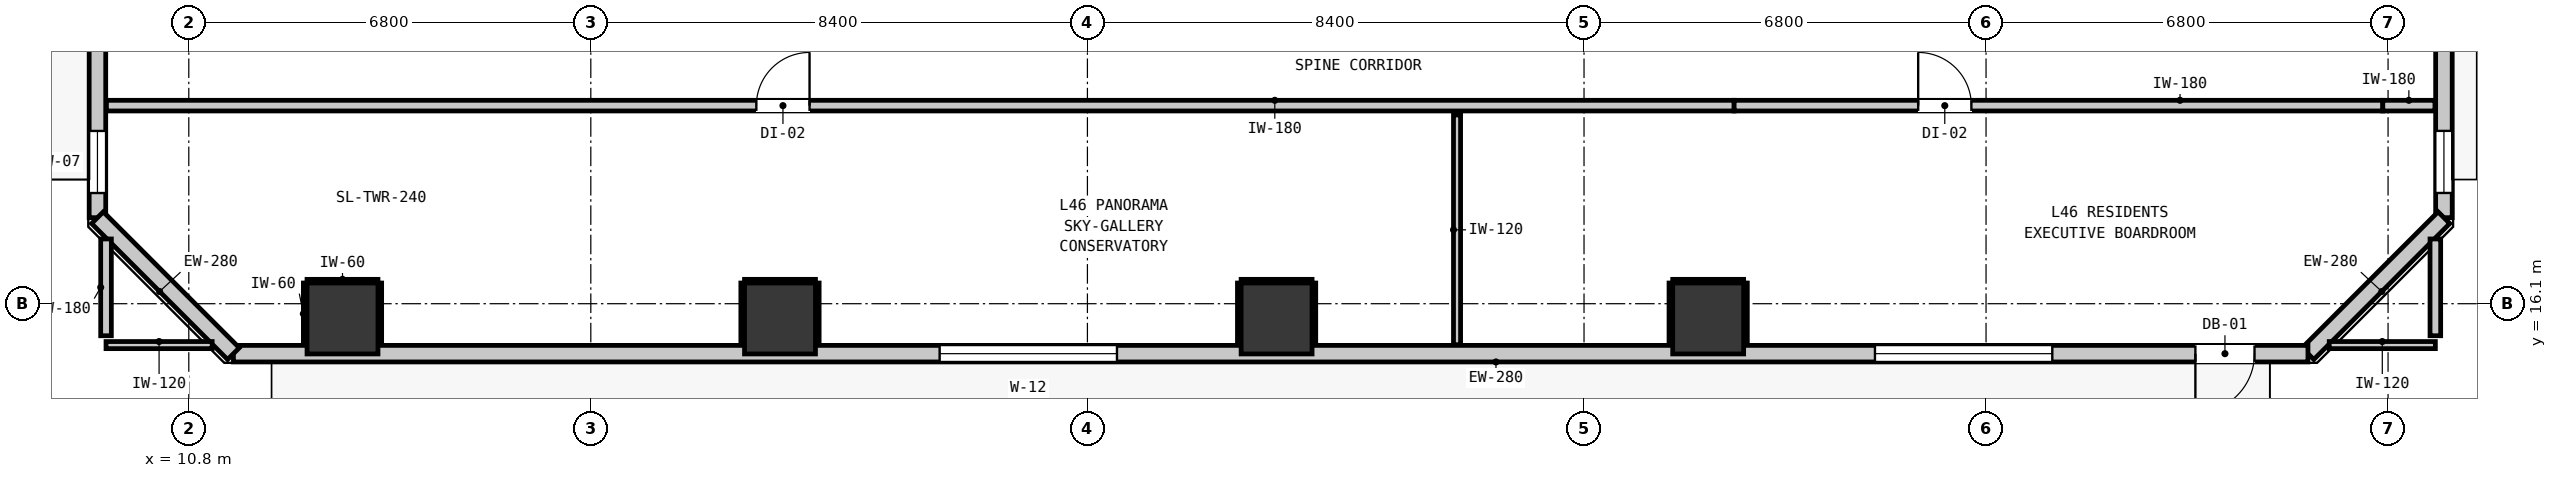
"""IFC4 building model, lengths in metres.
Left out: names, types, materials, properties, quantities, classifications, styles, units other than length and angle.
Written with IfcOpenShell. Run it as: python <this file> out.ifc"""

import sys

from ifc_helpers import new_model, si_unit, direction, frame, frame_2d, origin, origin_2d, place, context, subcontext, project, spatial, rectangle, extrude, element, fill, save


model = new_model("IFC4")
c1 = context("Model", 3, precision=1e-05, world=origin(), true_north=direction((0.0, 1.0)))
c2 = subcontext(c1, "Body", "Model", "MODEL_VIEW")
j1 = project(units=[si_unit("LENGTHUNIT", "METRE"), si_unit("PLANEANGLEUNIT", "RADIAN")], contexts=[c1])
p1 = place(None, origin())
s1 = spatial("IfcSite", under=j1, at=p1, CompositionType="ELEMENT")
p2 = place(p1, origin())
s2 = spatial("IfcBuilding", under=s1, at=p2, CompositionType="ELEMENT")
p3 = place(p2, frame((0.0, 0.0, 159.2)))
s3 = spatial("IfcBuildingStorey", under=s2, at=p3, CompositionType="ELEMENT", Elevation=159.2)
for number, where, z_axis, x_axis in (
    (1, (13.4, 15.85, 0.0), (0.0, 0.0, 1.0), (1.0, 0.0, 0.0)),
    (2, (20.8, 15.85, 0.0), (0.0, 0.0, 1.0), (1.0, 0.0, 0.0)),
    (3, (29.2, 15.85, 0.0), (0.0, 0.0, 1.0), (1.0, 0.0, 0.0)),
    (4, (36.5, 15.85, 0.0), (0.0, 0.0, 1.0), (1.0, 0.0, 0.0)),
):
    element("IfcColumn", number, at=place(p3, frame(where, z_axis=z_axis, x_axis=x_axis)), inside=s3, PredefinedType="COLUMN", context=c2, shape_type="SweptSolid", body=[
        extrude(rectangle(XDim=1.2, YDim=1.2, at=origin_2d()), origin(), (0.0, 0.0, 1.0), 3.32),
    ])
p4 = place(p3, frame((9.255, 17.555, 0.0), z_axis=(0.0, 0.0, 1.0), x_axis=(0.0, 1.0, 0.0)))
e5 = element("IfcWall", 5, at=p4, inside=s3, PredefinedType="STANDARD", context=c2, shape_type="SweptSolid", body=[
    extrude(rectangle(XDim=32.29, YDim=0.28, at=frame_2d((16.145, 0.0))), origin(), (0.0, 0.0, 1.0), 3.08),
])
p5 = place(p4, frame((5.467, 0.0, 0.0)))
e6 = element("IfcOpeningElement", 6, at=p5, cuts=e5, PredefinedType="OPENING", context=c2, shape_type="SweptSolid", body=[
    extrude(rectangle(XDim=1.0, YDim=2.15, at=frame_2d((0.5, 1.075))), frame((0.0, 0.15, 0.0), z_axis=(0.0, -1.0, 0.0), x_axis=(1.0, 0.0, 0.0)), (0.0, 0.0, 1.0), 0.3),
])
p6 = place(p4, frame((0.417, 0.0, 0.85)))
e7 = element("IfcOpeningElement", 7, at=p6, cuts=e5, PredefinedType="OPENING", context=c2, shape_type="SweptSolid", body=[
    extrude(rectangle(XDim=1.05, YDim=1.65, at=frame_2d((0.525, 0.825))), frame((0.0, 0.15, 0.0), z_axis=(0.0, -1.0, 0.0), x_axis=(1.0, 0.0, 0.0)), (0.0, 0.0, 1.0), 0.3),
])
p7 = place(p4, frame((30.753, 0.0, 0.85)))
e8 = element("IfcOpeningElement", 8, at=p7, cuts=e5, PredefinedType="OPENING", context=c2, shape_type="SweptSolid", body=[
    extrude(rectangle(XDim=1.05, YDim=1.65, at=frame_2d((0.525, 0.825))), frame((0.0, 0.15, 0.0), z_axis=(0.0, -1.0, 0.0), x_axis=(1.0, 0.0, 0.0)), (0.0, 0.0, 1.0), 0.3),
])
p8 = place(p3, frame((48.945, 49.845, 0.0), z_axis=(0.0, 0.0, 1.0), x_axis=(0.0, -1.0, 0.0)))
e9 = element("IfcWall", 9, at=p8, inside=s3, PredefinedType="STANDARD", context=c2, shape_type="SweptSolid", body=[
    extrude(rectangle(XDim=32.29, YDim=0.28, at=frame_2d((16.145, 0.0))), origin(), (0.0, 0.0, 1.0), 3.08),
])
p9 = place(p8, frame((2.659, 0.0, 0.0)))
e10 = element("IfcOpeningElement", 10, at=p9, cuts=e9, PredefinedType="OPENING", context=c2, shape_type="SweptSolid", body=[
    extrude(rectangle(XDim=1.0, YDim=2.15, at=frame_2d((0.5, 1.075))), frame((0.0, 0.15, 0.0), z_axis=(0.0, -1.0, 0.0), x_axis=(1.0, 0.0, 0.0)), (0.0, 0.0, 1.0), 0.3),
])
p10 = place(p8, frame((30.822, 0.0, 0.85)))
e11 = element("IfcOpeningElement", 11, at=p10, cuts=e9, PredefinedType="OPENING", context=c2, shape_type="SweptSolid", body=[
    extrude(rectangle(XDim=1.05, YDim=1.65, at=frame_2d((0.525, 0.825))), frame((0.0, 0.15, 0.0), z_axis=(0.0, -1.0, 0.0), x_axis=(1.0, 0.0, 0.0)), (0.0, 0.0, 1.0), 0.3),
])
p11 = place(p8, frame((4.027, 0.0, 0.85)))
e12 = element("IfcOpeningElement", 12, at=p11, cuts=e9, PredefinedType="OPENING", context=c2, shape_type="SweptSolid", body=[
    extrude(rectangle(XDim=0.9, YDim=1.5, at=frame_2d((0.45, 0.75))), frame((0.0, 0.15, 0.0), z_axis=(0.0, -1.0, 0.0), x_axis=(1.0, 0.0, 0.0)), (0.0, 0.0, 1.0), 0.3),
])
p12 = place(p8, frame((0.487, 0.0, 0.85)))
e13 = element("IfcOpeningElement", 13, at=p12, cuts=e9, PredefinedType="OPENING", context=c2, shape_type="SweptSolid", body=[
    extrude(rectangle(XDim=1.05, YDim=1.65, at=frame_2d((0.525, 0.825))), frame((0.0, 0.15, 0.0), z_axis=(0.0, -1.0, 0.0), x_axis=(1.0, 0.0, 0.0)), (0.0, 0.0, 1.0), 0.3),
])
p13 = place(p8, frame((21.995, 0.0, 0.85)))
e14 = element("IfcOpeningElement", 14, at=p13, cuts=e9, PredefinedType="OPENING", context=c2, shape_type="SweptSolid", body=[
    extrude(rectangle(XDim=3.0, YDim=2.1, at=frame_2d((1.5, 1.05))), frame((0.0, 0.15, 0.0), z_axis=(0.0, -1.0, 0.0), x_axis=(1.0, 0.0, 0.0)), (0.0, 0.0, 1.0), 0.3),
])
p14 = place(p3, frame((48.945, 17.555, 0.0), z_axis=(0.0, 0.0, 1.0), x_axis=(-0.707106781187, -0.707106781187, 0.0)))
e15 = element("IfcWall", 15, at=p14, inside=s3, PredefinedType="STANDARD", context=c2, shape_type="SweptSolid", body=[
    extrude(rectangle(XDim=3.253, YDim=0.28, at=frame_2d((1.626, 0.0))), origin(), (0.0, 0.0, 1.0), 3.08),
])
p15 = place(p3, frame((46.645, 15.255, 0.0), z_axis=(0.0, 0.0, 1.0), x_axis=(-1.0, 0.0, 0.0)))
e16 = element("IfcWall", 16, at=p15, inside=s3, PredefinedType="STANDARD", context=c2, shape_type="SweptSolid", body=[
    extrude(rectangle(XDim=35.09, YDim=0.28, at=frame_2d((17.545, 0.0))), origin(), (0.0, 0.0, 1.0), 3.08),
])
p16 = place(p15, frame((0.904, 0.0, 0.0)))
e17 = element("IfcOpeningElement", 17, at=p16, cuts=e16, PredefinedType="OPENING", context=c2, shape_type="SweptSolid", body=[
    extrude(rectangle(XDim=1.0, YDim=2.15, at=frame_2d((0.5, 1.075))), frame((0.0, 0.15, 0.0), z_axis=(0.0, -1.0, 0.0), x_axis=(1.0, 0.0, 0.0)), (0.0, 0.0, 1.0), 0.3),
])
p17 = place(p15, frame((20.145, 0.0, 0.85)))
e18 = element("IfcOpeningElement", 18, at=p17, cuts=e16, PredefinedType="OPENING", context=c2, shape_type="SweptSolid", body=[
    extrude(rectangle(XDim=3.0, YDim=2.1, at=frame_2d((1.5, 1.05))), frame((0.0, 0.15, 0.0), z_axis=(0.0, -1.0, 0.0), x_axis=(1.0, 0.0, 0.0)), (0.0, 0.0, 1.0), 0.3),
])
p18 = place(p15, frame((4.324, 0.0, 0.85)))
e19 = element("IfcOpeningElement", 19, at=p18, cuts=e16, PredefinedType="OPENING", context=c2, shape_type="SweptSolid", body=[
    extrude(rectangle(XDim=3.0, YDim=2.1, at=frame_2d((1.5, 1.05))), frame((0.0, 0.15, 0.0), z_axis=(0.0, -1.0, 0.0), x_axis=(1.0, 0.0, 0.0)), (0.0, 0.0, 1.0), 0.3),
])
p19 = place(p3, frame((11.555, 15.255, 0.0), z_axis=(0.0, 0.0, 1.0), x_axis=(-0.707106781187, 0.707106781187, 0.0)))
e20 = element("IfcWall", 20, at=p19, inside=s3, PredefinedType="STANDARD", context=c2, shape_type="SweptSolid", body=[
    extrude(rectangle(XDim=3.253, YDim=0.28, at=frame_2d((1.626, 0.0))), origin(), (0.0, 0.0, 1.0), 3.08),
])
p20 = place(p3, frame((9.407, 19.45, 0.0), z_axis=(0.0, 0.0, 1.0), x_axis=(1.0, 0.0, 0.0)))
e21 = element("IfcWall", 21, at=p20, inside=s3, PredefinedType="PARTITIONING", context=c2, shape_type="SweptSolid", body=[
    extrude(rectangle(XDim=27.532, YDim=0.18, at=frame_2d((13.766, 0.0))), origin(), (0.0, 0.0, 1.0), 3.08),
])
p21 = place(p20, frame((10.993, 0.0, 0.0)))
e22 = element("IfcOpeningElement", 22, at=p21, cuts=e21, PredefinedType="OPENING", context=c2, shape_type="SweptSolid", body=[
    extrude(rectangle(XDim=0.9, YDim=2.1, at=frame_2d((0.45, 1.05))), frame((0.0, 0.1, 0.0), z_axis=(0.0, -1.0, 0.0), x_axis=(1.0, 0.0, 0.0)), (0.0, 0.0, 1.0), 0.2),
])
p22 = place(p3, frame((36.939, 19.45, 0.0), z_axis=(0.0, 0.0, 1.0), x_axis=(1.0, 0.0, 0.0)))
e23 = element("IfcWall", 23, at=p22, inside=s3, PredefinedType="PARTITIONING", context=c2, shape_type="SweptSolid", body=[
    extrude(rectangle(XDim=10.972, YDim=0.18, at=frame_2d((5.486, 0.0))), origin(), (0.0, 0.0, 1.0), 2.565),
])
p23 = place(p22, frame((3.113, 0.0, 0.0)))
e24 = element("IfcOpeningElement", 24, at=p23, cuts=e23, PredefinedType="OPENING", context=c2, shape_type="SweptSolid", body=[
    extrude(rectangle(XDim=0.9, YDim=2.1, at=frame_2d((0.45, 1.05))), frame((0.0, 0.1, 0.0), z_axis=(0.0, -1.0, 0.0), x_axis=(1.0, 0.0, 0.0)), (0.0, 0.0, 1.0), 0.2),
])
p24 = place(p3, frame((47.911, 19.45, 0.0), z_axis=(0.0, 0.0, 1.0), x_axis=(1.0, 0.0, 0.0)))
e25 = element("IfcWall", 25, at=p24, inside=s3, PredefinedType="PARTITIONING", context=c2, shape_type="SweptSolid", body=[
    extrude(rectangle(XDim=0.882, YDim=0.18, at=frame_2d((0.441, 0.0))), origin(), (0.0, 0.0, 1.0), 3.08),
])
for number, where, z_axis, x_axis in (
    (26, (9.4, 15.4, 0.0), (0.0, 0.0, 1.0), (1.0, 0.0, 0.0)),
    (27, (47.005, 15.4, 0.0), (0.0, 0.0, 1.0), (1.0, 0.0, 0.0)),
):
    element("IfcWall", number, at=place(p3, frame(where, z_axis=z_axis, x_axis=x_axis)), inside=s3, PredefinedType="PARTITIONING", context=c2, shape_type="SweptSolid", body=[
        extrude(rectangle(XDim=1.795, YDim=0.12, at=frame_2d((0.897, 0.0))), origin(), (0.0, 0.0, 1.0), 3.08),
    ])
for number, where, z_axis, x_axis in (
    (28, (9.4, 15.558, 0.0), (0.0, 0.0, 1.0), (0.0, 1.0, 0.0)),
    (29, (48.8, 15.558, 0.0), (0.0, 0.0, 1.0), (0.0, 1.0, 0.0)),
):
    element("IfcWall", number, at=place(p3, frame(where, z_axis=z_axis, x_axis=x_axis)), inside=s3, PredefinedType="PARTITIONING", context=c2, shape_type="SweptSolid", body=[
        extrude(rectangle(XDim=1.637, YDim=0.18, at=frame_2d((0.818, 0.0))), origin(), (0.0, 0.0, 1.0), 3.08),
    ])
p25 = place(p3, frame((32.252, 15.407, 0.0), z_axis=(0.0, 0.0, 1.0), x_axis=(0.0, 1.0, 0.0)))
e30 = element("IfcWall", 30, at=p25, inside=s3, PredefinedType="PARTITIONING", context=c2, shape_type="SweptSolid", body=[
    extrude(rectangle(XDim=3.885, YDim=0.12, at=frame_2d((1.942, 0.0))), origin(), (0.0, 0.0, 1.0), 3.08),
])
p26 = place(p3, frame((12.8, 16.482, 0.0), z_axis=(0.0, 0.0, 1.0), x_axis=(1.0, 0.0, 0.0)))
e31 = element("IfcWall", 31, at=p26, inside=s3, PredefinedType="PARTITIONING", context=c2, shape_type="SweptSolid", body=[
    extrude(rectangle(XDim=1.2, YDim=0.06, at=frame_2d((0.6, 0.0))), origin(), (0.0, 0.0, 1.0), 1.45),
])
for number, where, z_axis, x_axis in (
    (32, (12.768, 15.41, 0.0), (0.0, 0.0, 1.0), (0.0, 1.0, 0.0)),
    (33, (14.032, 15.41, 0.0), (0.0, 0.0, 1.0), (0.0, 1.0, 0.0)),
):
    element("IfcWall", number, at=place(p3, frame(where, z_axis=z_axis, x_axis=x_axis)), inside=s3, PredefinedType="PARTITIONING", context=c2, shape_type="SweptSolid", body=[
        extrude(rectangle(XDim=1.04, YDim=0.06, at=frame_2d((0.52, 0.0))), origin(), (0.0, 0.0, 1.0), 1.45),
    ])
p27 = place(p3, frame((20.2, 16.482, 0.0), z_axis=(0.0, 0.0, 1.0), x_axis=(1.0, 0.0, 0.0)))
e34 = element("IfcWall", 34, at=p27, inside=s3, PredefinedType="PARTITIONING", context=c2, shape_type="SweptSolid", body=[
    extrude(rectangle(XDim=1.2, YDim=0.06, at=frame_2d((0.6, 0.0))), origin(), (0.0, 0.0, 1.0), 1.45),
])
for number, where, z_axis, x_axis in (
    (35, (20.168, 15.41, 0.0), (0.0, 0.0, 1.0), (0.0, 1.0, 0.0)),
    (36, (21.432, 15.41, 0.0), (0.0, 0.0, 1.0), (0.0, 1.0, 0.0)),
):
    element("IfcWall", number, at=place(p3, frame(where, z_axis=z_axis, x_axis=x_axis)), inside=s3, PredefinedType="PARTITIONING", context=c2, shape_type="SweptSolid", body=[
        extrude(rectangle(XDim=1.04, YDim=0.06, at=frame_2d((0.52, 0.0))), origin(), (0.0, 0.0, 1.0), 1.45),
    ])
p28 = place(p3, frame((28.6, 16.482, 0.0), z_axis=(0.0, 0.0, 1.0), x_axis=(1.0, 0.0, 0.0)))
e37 = element("IfcWall", 37, at=p28, inside=s3, PredefinedType="PARTITIONING", context=c2, shape_type="SweptSolid", body=[
    extrude(rectangle(XDim=1.2, YDim=0.06, at=frame_2d((0.6, 0.0))), origin(), (0.0, 0.0, 1.0), 1.45),
])
for number, where, z_axis, x_axis in (
    (38, (28.568, 15.41, 0.0), (0.0, 0.0, 1.0), (0.0, 1.0, 0.0)),
    (39, (29.832, 15.41, 0.0), (0.0, 0.0, 1.0), (0.0, 1.0, 0.0)),
):
    element("IfcWall", number, at=place(p3, frame(where, z_axis=z_axis, x_axis=x_axis)), inside=s3, PredefinedType="PARTITIONING", context=c2, shape_type="SweptSolid", body=[
        extrude(rectangle(XDim=1.04, YDim=0.06, at=frame_2d((0.52, 0.0))), origin(), (0.0, 0.0, 1.0), 1.45),
    ])
p29 = place(p3, frame((35.9, 16.482, 0.0), z_axis=(0.0, 0.0, 1.0), x_axis=(1.0, 0.0, 0.0)))
e40 = element("IfcWall", 40, at=p29, inside=s3, PredefinedType="PARTITIONING", context=c2, shape_type="SweptSolid", body=[
    extrude(rectangle(XDim=1.2, YDim=0.06, at=frame_2d((0.6, 0.0))), origin(), (0.0, 0.0, 1.0), 1.45),
])
for number, where, z_axis, x_axis in (
    (41, (35.868, 15.41, 0.0), (0.0, 0.0, 1.0), (0.0, 1.0, 0.0)),
    (42, (37.132, 15.41, 0.0), (0.0, 0.0, 1.0), (0.0, 1.0, 0.0)),
):
    element("IfcWall", number, at=place(p3, frame(where, z_axis=z_axis, x_axis=x_axis)), inside=s3, PredefinedType="PARTITIONING", context=c2, shape_type="SweptSolid", body=[
        extrude(rectangle(XDim=1.04, YDim=0.06, at=frame_2d((0.52, 0.0))), origin(), (0.0, 0.0, 1.0), 1.45),
    ])
p30 = place(p16, origin())
e43 = element("IfcDoor", 43, at=p30, inside=s3, OperationType="SINGLE_SWING_RIGHT", PredefinedType="DOOR", context=c2, shape_type="SweptSolid", body=[
    extrude(rectangle(XDim=1.0, YDim=2.15, at=frame_2d((0.5, 1.075))), frame((0.0, 0.025, 0.0), z_axis=(0.0, -1.0, 0.0), x_axis=(1.0, 0.0, 0.0)), (0.0, 0.0, 1.0), 0.05),
])
fill(e17, e43)
p31 = place(p6, origin())
e44 = element("IfcWindow", 44, at=p31, inside=s3, PartitioningType="SINGLE_PANEL", PredefinedType="WINDOW", context=c2, shape_type="SweptSolid", body=[
    extrude(rectangle(XDim=1.05, YDim=1.65, at=frame_2d((0.525, 0.825))), frame((0.0, 0.03, 0.0), z_axis=(0.0, -1.0, 0.0), x_axis=(1.0, 0.0, 0.0)), (0.0, 0.0, 1.0), 0.06),
])
fill(e7, e44)
p32 = place(p10, origin())
e45 = element("IfcWindow", 45, at=p32, inside=s3, PartitioningType="SINGLE_PANEL", PredefinedType="WINDOW", context=c2, shape_type="SweptSolid", body=[
    extrude(rectangle(XDim=1.05, YDim=1.65, at=frame_2d((0.525, 0.825))), frame((0.0, 0.03, 0.0), z_axis=(0.0, -1.0, 0.0), x_axis=(1.0, 0.0, 0.0)), (0.0, 0.0, 1.0), 0.06),
])
fill(e11, e45)
p33 = place(p17, origin())
e46 = element("IfcWindow", 46, at=p33, inside=s3, PartitioningType="SINGLE_PANEL", PredefinedType="WINDOW", context=c2, shape_type="SweptSolid", body=[
    extrude(rectangle(XDim=3.0, YDim=2.1, at=frame_2d((1.5, 1.05))), frame((0.0, 0.03, 0.0), z_axis=(0.0, -1.0, 0.0), x_axis=(1.0, 0.0, 0.0)), (0.0, 0.0, 1.0), 0.06),
])
fill(e18, e46)
p34 = place(p18, origin())
e47 = element("IfcWindow", 47, at=p34, inside=s3, PartitioningType="SINGLE_PANEL", PredefinedType="WINDOW", context=c2, shape_type="SweptSolid", body=[
    extrude(rectangle(XDim=3.0, YDim=2.1, at=frame_2d((1.5, 1.05))), frame((0.0, 0.03, 0.0), z_axis=(0.0, -1.0, 0.0), x_axis=(1.0, 0.0, 0.0)), (0.0, 0.0, 1.0), 0.06),
])
fill(e19, e47)
p35 = place(p21, origin())
e48 = element("IfcDoor", 48, at=p35, inside=s3, OperationType="SINGLE_SWING_RIGHT", PredefinedType="DOOR", context=c2, shape_type="SweptSolid", body=[
    extrude(rectangle(XDim=0.9, YDim=2.1, at=frame_2d((0.45, 1.05))), frame((0.0, 0.025, 0.0), z_axis=(0.0, -1.0, 0.0), x_axis=(1.0, 0.0, 0.0)), (0.0, 0.0, 1.0), 0.05),
])
fill(e22, e48)
p36 = place(p23, origin())
e49 = element("IfcDoor", 49, at=p36, inside=s3, OperationType="SINGLE_SWING_LEFT", PredefinedType="DOOR", context=c2, shape_type="SweptSolid", body=[
    extrude(rectangle(XDim=0.9, YDim=2.1, at=frame_2d((0.45, 1.05))), frame((0.0, 0.025, 0.0), z_axis=(0.0, -1.0, 0.0), x_axis=(1.0, 0.0, 0.0)), (0.0, 0.0, 1.0), 0.05),
])
fill(e24, e49)
save(model, sys.argv[1])
